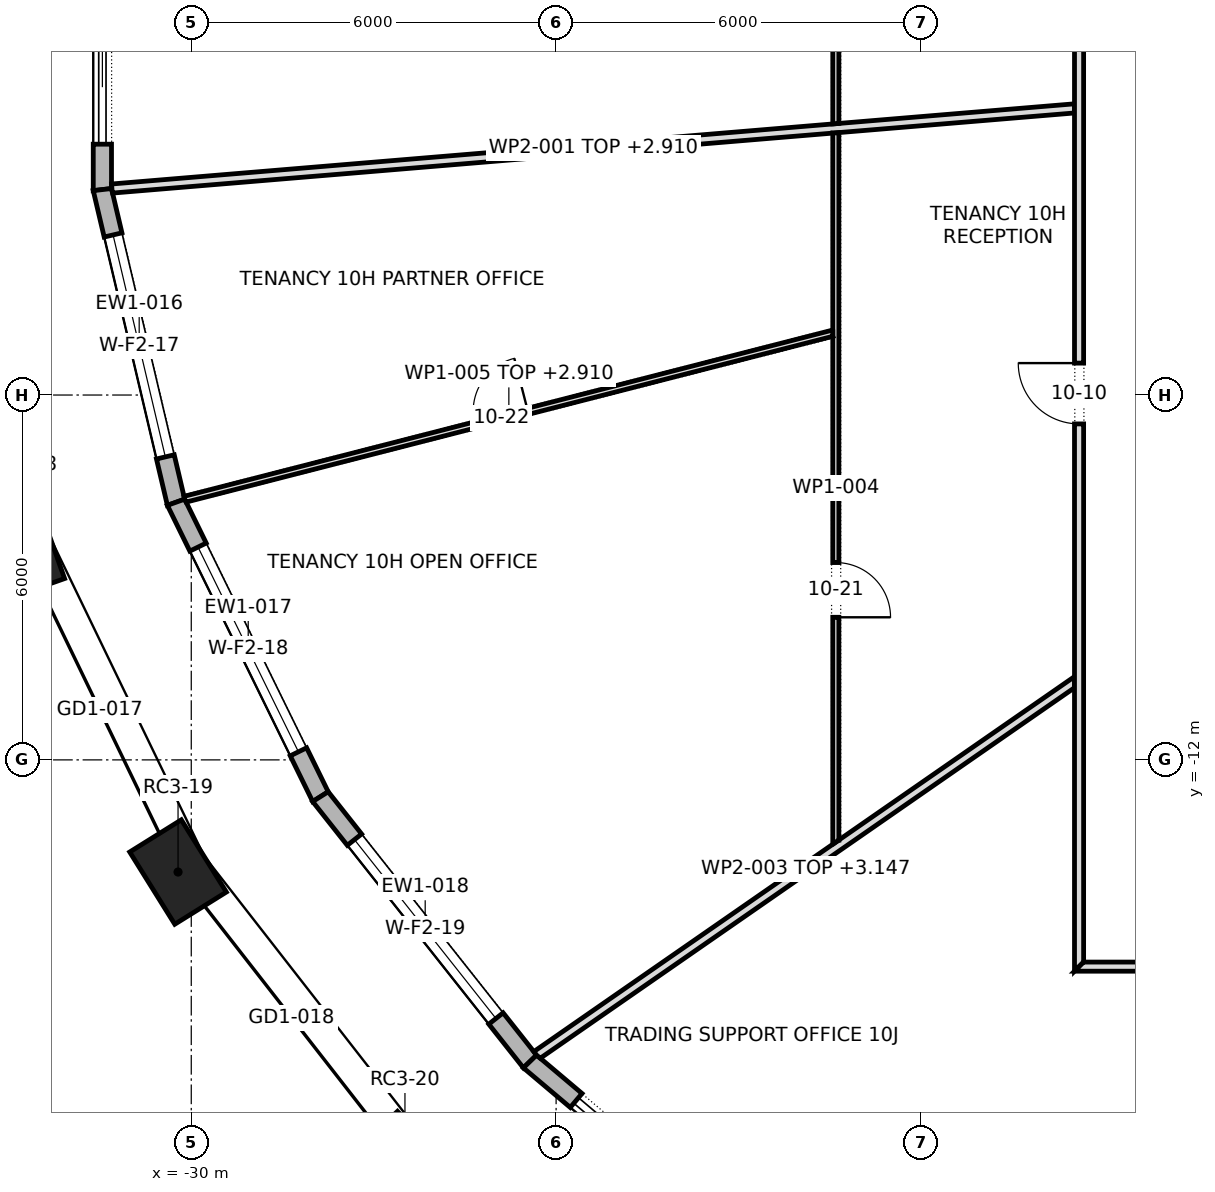
"""IFC4 building model, lengths in metres.
Left out: names, types, materials, properties, quantities, classifications, styles, units other than length and angle.
Written with IfcOpenShell. Run it as: python <this file> out.ifc"""

import sys

from ifc_helpers import new_model, si_unit, direction, frame, frame_2d, origin, origin_2d, place, context, subcontext, project, spatial, polyline, rectangle, outline, extrude, element, fill, save


model = new_model("IFC4")
c1 = context("Model", 3, precision=1e-05, world=origin(), true_north=direction((0.0, 1.0)))
c2 = subcontext(c1, "Body", "Model", "MODEL_VIEW")
j1 = project(units=[si_unit("LENGTHUNIT", "METRE"), si_unit("PLANEANGLEUNIT", "RADIAN")], contexts=[c1])
p1 = place(None, origin())
s1 = spatial("IfcSite", under=j1, at=p1, CompositionType="ELEMENT")
p2 = place(p1, origin())
s2 = spatial("IfcBuilding", under=s1, at=p2, CompositionType="ELEMENT")
p3 = place(p2, frame((0.0, 0.0, 142.3)))
s3 = spatial("IfcBuildingStorey", under=s2, at=p3, CompositionType="ELEMENT", Elevation=142.3)
for number, where, z_axis, x_axis in (
    (1, (-32.788, -8.525, 0.0), (0.0, 0.0, 1.0), (0.334, -0.943, 0.0)),
    (2, (-30.217, -13.844, 0.0), (0.0, 0.0, 1.0), (0.529, -0.849, 0.0)),
    (3, (-26.486, -18.631, 0.0), (0.0, 0.0, 1.0), (0.692, -0.722, 0.0)),
):
    element("IfcColumn", number, at=place(p3, frame(where, z_axis=z_axis, x_axis=x_axis)), inside=s3, PredefinedType="COLUMN", context=c2, shape_type="SweptSolid", body=[
        extrude(rectangle(XDim=1.4, YDim=1.0, at=origin_2d()), origin(), (0.0, 0.0, 1.0), 4.2),
    ])
p4 = place(p3, frame((-31.462, 2.622, 0.0), z_axis=(0.0, 0.0, 1.0), x_axis=(0.0, -1.0, 0.0)))
e4 = element("IfcWall", 4, at=p4, inside=s3, PredefinedType="STANDARD", context=c2, shape_type="SweptSolid", body=[
    extrude(outline(polyline([(-0.017, -0.15), (5.26, -0.15), (5.226, 0.15), (0.017, 0.15), (-0.017, -0.15)])), origin(), (0.0, 0.0, 1.0), 3.9),
])
p5 = place(p4, frame((0.747, 0.0, 0.0)))
e5 = element("IfcOpeningElement", 5, at=p5, cuts=e4, PredefinedType="OPENING", context=c2, shape_type="SweptSolid", body=[
    extrude(rectangle(XDim=3.75, YDim=3.45, at=frame_2d((1.875, 1.725))), frame((0.0, 0.162, 0.0), z_axis=(0.0, -1.0, 0.0), x_axis=(1.0, 0.0, 0.0)), (0.0, 0.0, 1.0), 0.324),
])
p6 = place(p3, frame((-31.462, -2.622, 0.0), z_axis=(0.0, 0.0, 1.0), x_axis=(0.229289208312, -0.973358340464, 0.0)))
e6 = element("IfcWall", 6, at=p6, inside=s3, PredefinedType="STANDARD", context=c2, shape_type="SweptSolid", body=[
    extrude(outline(polyline([(-0.017, -0.15), (5.299, -0.15), (5.265, 0.15), (0.017, 0.15), (-0.017, -0.15)])), origin(), (0.0, 0.0, 1.0), 3.9),
])
p7 = place(p6, frame((0.766, 0.0, 0.6)))
e7 = element("IfcOpeningElement", 7, at=p7, cuts=e6, PredefinedType="OPENING", context=c2, shape_type="SweptSolid", body=[
    extrude(rectangle(XDim=3.75, YDim=2.85, at=frame_2d((1.875, 1.425))), frame((0.0, 0.162, 0.0), z_axis=(0.0, -1.0, 0.0), x_axis=(1.0, 0.0, 0.0)), (0.0, 0.0, 1.0), 0.324),
])
p8 = place(p3, frame((-30.25, -7.763, 0.0), z_axis=(0.0, 0.0, 1.0), x_axis=(0.440373354088, -0.897814740918, 0.0)))
e8 = element("IfcWall", 8, at=p8, inside=s3, PredefinedType="STANDARD", context=c2, shape_type="SweptSolid", body=[
    extrude(outline(polyline([(-0.017, -0.15), (5.409, -0.15), (5.376, 0.15), (0.017, 0.15), (-0.017, -0.15)])), origin(), (0.0, 0.0, 1.0), 3.9),
])
p9 = place(p8, frame((0.821, 0.0, 0.6)))
e9 = element("IfcOpeningElement", 9, at=p9, cuts=e8, PredefinedType="OPENING", context=c2, shape_type="SweptSolid", body=[
    extrude(rectangle(XDim=3.75, YDim=2.85, at=frame_2d((1.875, 1.425))), frame((0.0, 0.162, 0.0), z_axis=(0.0, -1.0, 0.0), x_axis=(1.0, 0.0, 0.0)), (0.0, 0.0, 1.0), 0.324),
])
p10 = place(p3, frame((-27.876, -12.605, 0.0), z_axis=(0.0, 0.0, 1.0), x_axis=(0.620520511988, -0.784190215574, 0.0)))
e10 = element("IfcWall", 10, at=p10, inside=s3, PredefinedType="STANDARD", context=c2, shape_type="SweptSolid", body=[
    extrude(outline(polyline([(-0.016, -0.15), (5.569, -0.15), (5.538, 0.15), (0.016, 0.15), (-0.016, -0.15)])), origin(), (0.0, 0.0, 1.0), 3.9),
])
p11 = place(p10, frame((0.902, 0.0, 0.6)))
e11 = element("IfcOpeningElement", 11, at=p11, cuts=e10, PredefinedType="OPENING", context=c2, shape_type="SweptSolid", body=[
    extrude(rectangle(XDim=3.75, YDim=2.85, at=frame_2d((1.875, 1.425))), frame((0.0, 0.162, 0.0), z_axis=(0.0, -1.0, 0.0), x_axis=(1.0, 0.0, 0.0)), (0.0, 0.0, 1.0), 0.324),
])
p12 = place(p3, frame((-24.43, -16.96, 0.0), z_axis=(0.0, 0.0, 1.0), x_axis=(0.764047627809, -0.64515984255, 0.0)))
e12 = element("IfcWall", 12, at=p12, inside=s3, PredefinedType="STANDARD", context=c2, shape_type="SweptSolid", body=[
    extrude(outline(polyline([(-0.015, -0.15), (5.752, -0.15), (5.723, 0.15), (0.015, 0.15), (-0.015, -0.15)])), origin(), (0.0, 0.0, 1.0), 3.9),
])
p13 = place(p12, frame((0.994, 0.0, 0.0)))
e13 = element("IfcOpeningElement", 13, at=p13, cuts=e12, PredefinedType="OPENING", context=c2, shape_type="SweptSolid", body=[
    extrude(rectangle(XDim=3.75, YDim=3.45, at=frame_2d((1.875, 1.725))), frame((0.0, 0.162, 0.0), z_axis=(0.0, -1.0, 0.0), x_axis=(1.0, 0.0, 0.0)), (0.0, 0.0, 1.0), 0.324),
])
p14 = place(p3, frame((-31.305, -2.604, 0.0), z_axis=(0.0, 0.0, 1.0), x_axis=(0.996551160003, 0.082980633261, 0.0)))
e14 = element("IfcWall", 14, at=p14, inside=s3, PredefinedType="PARTITIONING", context=c2, shape_type="SweptSolid", body=[
    extrude(outline(polyline([(0.005, -0.075), (1.985, -0.075), (3.966, -0.075), (5.947, -0.075), (7.928, -0.075), (9.909, -0.075), (11.89, -0.075), (11.89, -0.075), (11.891, -0.075), (13.885, -0.075), (15.878, -0.075), (15.89, 0.068), (15.89, 0.075), (13.904, 0.075), (11.918, 0.075), (9.931, 0.075), (7.945, 0.075), (5.959, 0.075), (3.973, 0.075), (1.986, 0.075), (0.0, 0.075), (0.0, -0.044), (0.005, -0.075)])), origin(), (0.0, 0.0, 1.0), 2.91),
])
p15 = place(p3, frame((-24.324, -16.859, 0.0), z_axis=(0.0, 0.0, 1.0), x_axis=(0.821700462415, 0.569919599652, 0.0)))
e15 = element("IfcWall", 15, at=p15, inside=s3, PredefinedType="PARTITIONING", context=c2, shape_type="SweptSolid", body=[
    extrude(outline(polyline([(0.025, -0.075), (1.807, -0.075), (3.589, -0.075), (5.371, -0.075), (7.153, -0.075), (8.935, -0.075), (10.717, -0.075), (10.82, 0.074), (10.82, 0.075), (9.249, 0.075), (7.677, 0.075), (6.105, 0.075), (6.104, 0.073), (6.102, 0.075), (4.576, 0.075), (3.051, 0.075), (1.525, 0.075), (0.0, 0.075), (0.0, 0.071), (0.004, 0.002), (0.025, -0.075)])), origin(), (0.0, 0.0, 1.0), 3.147),
])
p16 = place(p3, frame((-19.4, -13.387, 0.0), z_axis=(0.0, 0.0, 1.0), x_axis=(0.0, 1.0, 0.0)))
e16 = element("IfcWall", 16, at=p16, inside=s3, PredefinedType="PARTITIONING", context=c2, shape_type="SweptSolid", body=[
    extrude(outline(polyline([(11.703, -0.05), (11.703, -0.046), (11.695, 0.05), (10.028, 0.05), (8.361, 0.05), (8.354, 0.048), (8.353, 0.05), (6.682, 0.05), (5.012, 0.05), (3.341, 0.05), (1.671, 0.05), (0.0, 0.05), (0.0, 0.05), (0.069, -0.05), (2.008, -0.05), (3.947, -0.05), (5.886, -0.05), (7.825, -0.05), (9.764, -0.05), (11.703, -0.05)])), origin(), (0.0, 0.0, 1.0), 3.9),
])
p17 = place(p16, frame((3.732, 0.0, 0.0)))
e17 = element("IfcOpeningElement", 17, at=p17, cuts=e16, PredefinedType="OPENING", context=c2, shape_type="SweptSolid", body=[
    extrude(rectangle(XDim=0.9, YDim=2.1, at=frame_2d((0.45, 1.05))), frame((0.0, 0.062, 0.0), z_axis=(0.0, -1.0, 0.0), x_axis=(1.0, 0.0, 0.0)), (0.0, 0.0, 1.0), 0.124),
])
p18 = place(p3, frame((-19.438, -4.98, 0.0), z_axis=(0.0, 0.0, 1.0), x_axis=(-0.968675214927, -0.248331085419, 0.0)))
e18 = element("IfcWall", 18, at=p18, inside=s3, PredefinedType="PARTITIONING", context=c2, shape_type="SweptSolid", body=[
    extrude(outline(polyline([(11.014, -0.05), (11.014, 0.002), (11.004, 0.05), (9.174, 0.05), (7.344, 0.05), (5.515, 0.05), (3.685, 0.05), (1.855, 0.05), (0.025, 0.05), (0.0, -0.049), (0.0, -0.05), (1.836, -0.05), (3.671, -0.05), (5.507, -0.05), (7.343, -0.05), (9.178, -0.05), (11.014, -0.05)])), origin(), (0.0, 0.0, 1.0), 2.91),
])
p19 = place(p18, frame((5.189, 0.0, 0.0)))
e19 = element("IfcOpeningElement", 19, at=p19, cuts=e18, PredefinedType="OPENING", context=c2, shape_type="SweptSolid", body=[
    extrude(rectangle(XDim=0.9, YDim=2.1, at=frame_2d((0.45, 1.05))), frame((0.0, 0.062, 0.0), z_axis=(0.0, -1.0, 0.0), x_axis=(1.0, 0.0, 0.0)), (0.0, 0.0, 1.0), 0.124),
])
p20 = place(p3, frame((-19.4, -1.542, 0.0), z_axis=(0.0, 0.0, 1.0), x_axis=(0.0, 1.0, 0.0)))
e20 = element("IfcWall", 20, at=p20, inside=s3, PredefinedType="PARTITIONING", context=c2, shape_type="SweptSolid", body=[
    extrude(outline(polyline([(0.008, -0.05), (1.611, -0.05), (3.213, -0.05), (4.816, -0.05), (6.418, -0.05), (6.444, 0.05), (4.833, 0.05), (3.222, 0.05), (1.611, 0.05), (0.0, 0.05), (0.0, 0.05), (0.008, -0.05)])), origin(), (0.0, 0.0, 1.0), 3.9),
])
p21 = place(p20, frame((2.772, 0.0, 0.0)))
e21 = element("IfcOpeningElement", 21, at=p21, cuts=e20, PredefinedType="OPENING", context=c2, shape_type="SweptSolid", body=[
    extrude(rectangle(XDim=0.9, YDim=2.1, at=frame_2d((0.45, 1.05))), frame((0.0, 0.062, 0.0), z_axis=(0.0, -1.0, 0.0), x_axis=(1.0, 0.0, 0.0)), (0.0, 0.0, 1.0), 0.124),
])
p22 = place(p3, frame((-15.4, -15.475, 0.0), z_axis=(0.0, 0.0, 1.0), x_axis=(0.0, 1.0, 0.0)))
e22 = element("IfcWall", 22, at=p22, inside=s3, PredefinedType="PARTITIONING", context=c2, shape_type="SweptSolid", body=[
    extrude(outline(polyline([(0.15, -0.075), (2.066, -0.075), (3.981, -0.075), (5.897, -0.075), (7.812, -0.075), (9.728, -0.075), (11.644, -0.075), (13.56, -0.075), (15.475, -0.075), (17.391, -0.075), (19.306, -0.075), (21.222, -0.075), (23.138, -0.075), (25.053, -0.075), (26.969, -0.075), (28.885, -0.075), (30.8, -0.075), (30.95, 0.075), (29.016, 0.075), (27.081, 0.075), (25.147, 0.075), (23.212, 0.075), (21.278, 0.075), (19.344, 0.075), (17.409, 0.075), (15.475, 0.075), (13.541, 0.075), (11.606, 0.075), (9.672, 0.075), (7.738, 0.075), (5.803, 0.075), (3.869, 0.075), (1.935, 0.075), (0.0, 0.075), (0.15, -0.075)])), origin(), (0.0, 0.0, 1.0), 3.9),
])
p23 = place(p22, frame((24.245, 0.0, 0.0)))
e23 = element("IfcOpeningElement", 23, at=p23, cuts=e22, PredefinedType="OPENING", context=c2, shape_type="SweptSolid", body=[
    extrude(rectangle(XDim=1.8, YDim=2.1, at=frame_2d((0.9, 1.05))), frame((0.0, 0.087, 0.0), z_axis=(0.0, -1.0, 0.0), x_axis=(1.0, 0.0, 0.0)), (0.0, 0.0, 1.0), 0.174),
])
p24 = place(p22, frame((16.305, 0.0, 0.0)))
e24 = element("IfcOpeningElement", 24, at=p24, cuts=e22, PredefinedType="OPENING", context=c2, shape_type="SweptSolid", body=[
    extrude(rectangle(XDim=1.0, YDim=2.1, at=frame_2d((0.5, 1.05))), frame((0.0, 0.087, 0.0), z_axis=(0.0, -1.0, 0.0), x_axis=(1.0, 0.0, 0.0)), (0.0, 0.0, 1.0), 0.174),
])
p25 = place(p22, frame((9.0, 0.0, 0.0)))
e25 = element("IfcOpeningElement", 25, at=p25, cuts=e22, PredefinedType="OPENING", context=c2, shape_type="SweptSolid", body=[
    extrude(rectangle(XDim=1.0, YDim=2.1, at=frame_2d((0.5, 1.05))), frame((0.0, 0.087, 0.0), z_axis=(0.0, -1.0, 0.0), x_axis=(1.0, 0.0, 0.0)), (0.0, 0.0, 1.0), 0.174),
])
p26 = place(p3, frame((-15.475, -15.4, 0.0), z_axis=(0.0, 0.0, 1.0), x_axis=(1.0, 0.0, 0.0)))
e26 = element("IfcWall", 26, at=p26, inside=s3, PredefinedType="PARTITIONING", context=c2, shape_type="SweptSolid", body=[
    extrude(outline(polyline([(0.0, -0.075), (1.935, -0.075), (3.869, -0.075), (5.803, -0.075), (7.738, -0.075), (9.672, -0.075), (11.606, -0.075), (13.541, -0.075), (15.475, -0.075), (17.409, -0.075), (19.344, -0.075), (21.278, -0.075), (23.212, -0.075), (25.147, -0.075), (27.081, -0.075), (29.016, -0.075), (30.95, -0.075), (30.8, 0.075), (28.885, 0.075), (26.969, 0.075), (25.053, 0.075), (23.138, 0.075), (21.222, 0.075), (19.306, 0.075), (17.391, 0.075), (15.475, 0.075), (13.56, 0.075), (11.644, 0.075), (9.728, 0.075), (7.812, 0.075), (5.897, 0.075), (3.981, 0.075), (2.066, 0.075), (0.15, 0.075), (0.0, -0.075)])), origin(), (0.0, 0.0, 1.0), 3.9),
])
p27 = place(p26, frame((2.4, 0.0, 0.0)))
e27 = element("IfcOpeningElement", 27, at=p27, cuts=e26, PredefinedType="OPENING", context=c2, shape_type="SweptSolid", body=[
    extrude(rectangle(XDim=1.0, YDim=2.1, at=frame_2d((0.5, 1.05))), frame((0.0, 0.087, 0.0), z_axis=(0.0, -1.0, 0.0), x_axis=(1.0, 0.0, 0.0)), (0.0, 0.0, 1.0), 0.174),
])
p28 = place(p26, frame((18.705, 0.0, 0.0)))
e28 = element("IfcOpeningElement", 28, at=p28, cuts=e26, PredefinedType="OPENING", context=c2, shape_type="SweptSolid", body=[
    extrude(rectangle(XDim=1.0, YDim=2.1, at=frame_2d((0.5, 1.05))), frame((0.0, 0.087, 0.0), z_axis=(0.0, -1.0, 0.0), x_axis=(1.0, 0.0, 0.0)), (0.0, 0.0, 1.0), 0.174),
])
p29 = place(p26, frame((13.535, 0.0, 0.0)))
e29 = element("IfcOpeningElement", 29, at=p29, cuts=e26, PredefinedType="OPENING", context=c2, shape_type="SweptSolid", body=[
    extrude(rectangle(XDim=1.0, YDim=2.1, at=frame_2d((0.5, 1.05))), frame((0.0, 0.087, 0.0), z_axis=(0.0, -1.0, 0.0), x_axis=(1.0, 0.0, 0.0)), (0.0, 0.0, 1.0), 0.174),
])
p30 = place(p26, frame((7.695, 0.0, 0.0)))
e30 = element("IfcOpeningElement", 30, at=p30, cuts=e26, PredefinedType="OPENING", context=c2, shape_type="SweptSolid", body=[
    extrude(rectangle(XDim=1.0, YDim=2.1, at=frame_2d((0.5, 1.05))), frame((0.0, 0.087, 0.0), z_axis=(0.0, -1.0, 0.0), x_axis=(1.0, 0.0, 0.0)), (0.0, 0.0, 1.0), 0.174),
])
p31 = place(p26, frame((25.04, 0.0, 0.0)))
e31 = element("IfcOpeningElement", 31, at=p31, cuts=e26, PredefinedType="OPENING", context=c2, shape_type="SweptSolid", body=[
    extrude(rectangle(XDim=1.8, YDim=2.1, at=frame_2d((0.9, 1.05))), frame((0.0, 0.087, 0.0), z_axis=(0.0, -1.0, 0.0), x_axis=(1.0, 0.0, 0.0)), (0.0, 0.0, 1.0), 0.174),
])
p32 = place(p3, frame((-14.837, -23.432, 0.0), z_axis=(0.0, 0.0, 1.0), x_axis=(0.535485065479, 0.844544696655, 0.0)))
e32 = element("IfcWall", 32, at=p32, inside=s3, PredefinedType="PARTITIONING", context=c2, shape_type="SweptSolid", body=[
    extrude(outline(polyline([(0.02, -0.075), (1.639, -0.075), (3.257, -0.075), (4.876, -0.075), (4.88, -0.073), (4.881, -0.075), (6.411, -0.075), (7.94, -0.075), (9.469, -0.075), (9.469, -0.074), (9.375, 0.075), (7.5, 0.075), (5.625, 0.075), (3.75, 0.075), (1.875, 0.075), (0.0, 0.075), (0.0, 0.066), (0.004, -0.004), (0.02, -0.075)])), origin(), (0.0, 0.0, 1.0), 3.147),
])
p33 = place(p5, origin())
e33 = element("IfcDoor", 33, at=p33, inside=s3, OperationType="DOUBLE_DOOR_SLIDING", PredefinedType="DOOR", context=c2, shape_type="SweptSolid", body=[
    extrude(rectangle(XDim=3.75, YDim=3.45, at=frame_2d((1.875, 1.725))), frame((0.0, 0.025, 0.0), z_axis=(0.0, -1.0, 0.0), x_axis=(1.0, 0.0, 0.0)), (0.0, 0.0, 1.0), 0.05),
])
fill(e5, e33)
p34 = place(p7, origin())
e34 = element("IfcWindow", 34, at=p34, inside=s3, PartitioningType="TRIPLE_PANEL_VERTICAL", PredefinedType="WINDOW", context=c2, shape_type="SweptSolid", body=[
    extrude(rectangle(XDim=3.75, YDim=2.85, at=frame_2d((1.875, 1.425))), frame((0.0, 0.03, 0.0), z_axis=(0.0, -1.0, 0.0), x_axis=(1.0, 0.0, 0.0)), (0.0, 0.0, 1.0), 0.06),
])
fill(e7, e34)
p35 = place(p9, origin())
e35 = element("IfcWindow", 35, at=p35, inside=s3, PartitioningType="TRIPLE_PANEL_VERTICAL", PredefinedType="WINDOW", context=c2, shape_type="SweptSolid", body=[
    extrude(rectangle(XDim=3.75, YDim=2.85, at=frame_2d((1.875, 1.425))), frame((0.0, 0.03, 0.0), z_axis=(0.0, -1.0, 0.0), x_axis=(1.0, 0.0, 0.0)), (0.0, 0.0, 1.0), 0.06),
])
fill(e9, e35)
p36 = place(p11, origin())
e36 = element("IfcWindow", 36, at=p36, inside=s3, PartitioningType="TRIPLE_PANEL_VERTICAL", PredefinedType="WINDOW", context=c2, shape_type="SweptSolid", body=[
    extrude(rectangle(XDim=3.75, YDim=2.85, at=frame_2d((1.875, 1.425))), frame((0.0, 0.03, 0.0), z_axis=(0.0, -1.0, 0.0), x_axis=(1.0, 0.0, 0.0)), (0.0, 0.0, 1.0), 0.06),
])
fill(e11, e36)
p37 = place(p13, origin())
e37 = element("IfcDoor", 37, at=p37, inside=s3, OperationType="DOUBLE_DOOR_SLIDING", PredefinedType="DOOR", context=c2, shape_type="SweptSolid", body=[
    extrude(rectangle(XDim=3.75, YDim=3.45, at=frame_2d((1.875, 1.725))), frame((0.0, 0.025, 0.0), z_axis=(0.0, -1.0, 0.0), x_axis=(1.0, 0.0, 0.0)), (0.0, 0.0, 1.0), 0.05),
])
fill(e13, e37)
p38 = place(p25, origin())
e38 = element("IfcDoor", 38, at=p38, inside=s3, OperationType="SINGLE_SWING_LEFT", PredefinedType="DOOR", context=c2, shape_type="SweptSolid", body=[
    extrude(rectangle(XDim=1.0, YDim=2.1, at=frame_2d((0.5, 1.05))), frame((0.0, 0.025, 0.0), z_axis=(0.0, -1.0, 0.0), x_axis=(1.0, 0.0, 0.0)), (0.0, 0.0, 1.0), 0.05),
])
fill(e25, e38)
p39 = place(p17, frame((0.9, 0.0, 0.0), z_axis=(0.0, 0.0, 1.0), x_axis=(-1.0, 0.0, 0.0)))
e39 = element("IfcDoor", 39, at=p39, inside=s3, OperationType="SINGLE_SWING_LEFT", PredefinedType="DOOR", context=c2, shape_type="SweptSolid", body=[
    extrude(rectangle(XDim=0.9, YDim=2.1, at=frame_2d((0.45, 1.05))), frame((0.0, 0.025, 0.0), z_axis=(0.0, -1.0, 0.0), x_axis=(1.0, 0.0, 0.0)), (0.0, 0.0, 1.0), 0.05),
])
fill(e17, e39)
p40 = place(p19, frame((0.9, 0.0, 0.0), z_axis=(0.0, 0.0, 1.0), x_axis=(-1.0, 0.0, 0.0)))
e40 = element("IfcDoor", 40, at=p40, inside=s3, OperationType="SINGLE_SWING_LEFT", PredefinedType="DOOR", context=c2, shape_type="SweptSolid", body=[
    extrude(rectangle(XDim=0.9, YDim=2.1, at=frame_2d((0.45, 1.05))), frame((0.0, 0.025, 0.0), z_axis=(0.0, -1.0, 0.0), x_axis=(1.0, 0.0, 0.0)), (0.0, 0.0, 1.0), 0.05),
])
fill(e19, e40)
save(model, sys.argv[1])
